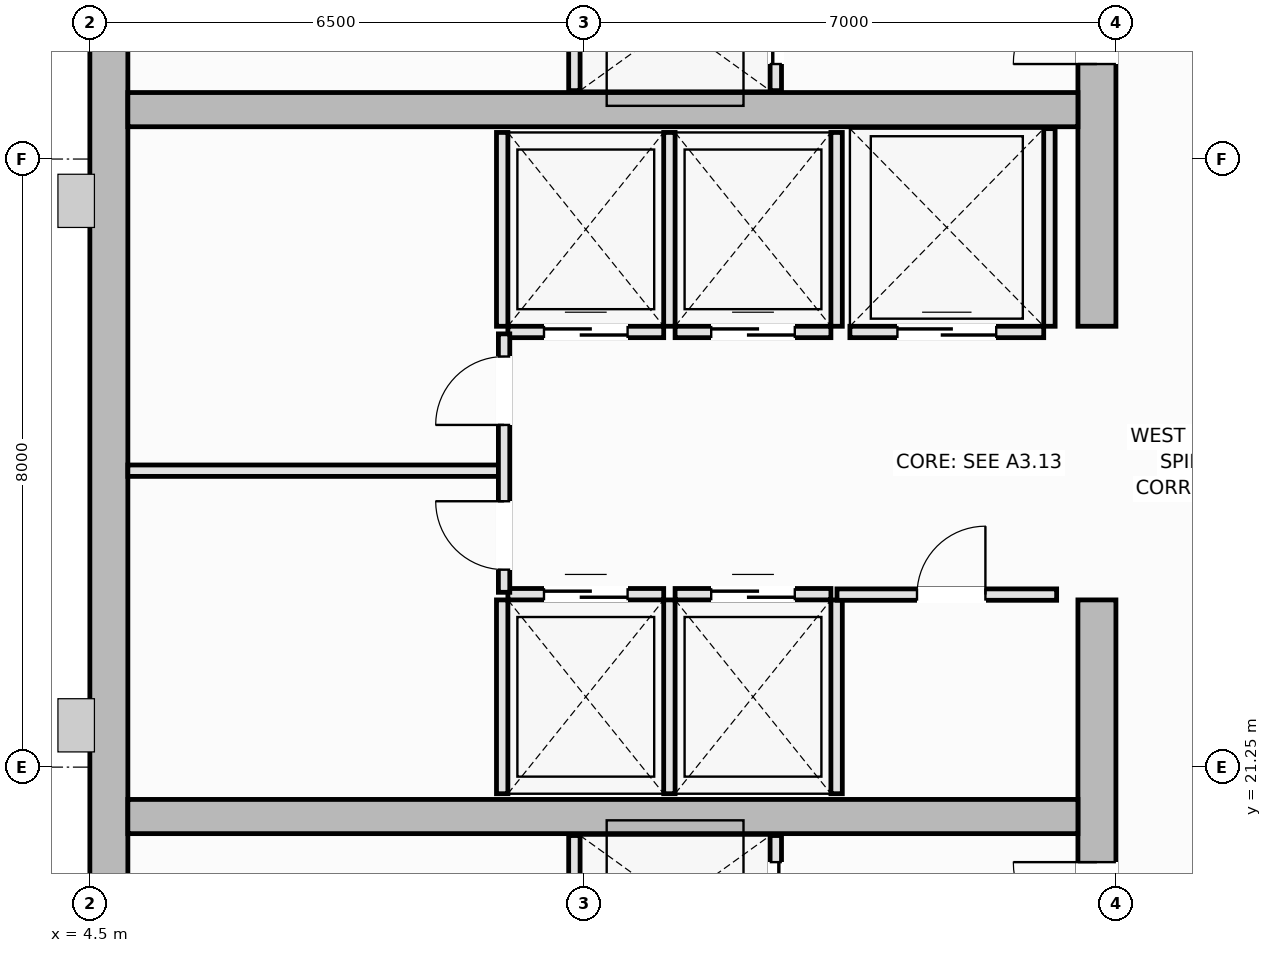
"""IFC4 building model, lengths in metres.
Left out: names, types, materials, properties, quantities, classifications, styles, units other than length and angle.
Written with IfcOpenShell. Run it as: python <this file> out.ifc"""

import sys

from ifc_helpers import new_model, si_unit, direction, frame, frame_2d, origin, place, context, subcontext, project, spatial, rectangle, extrude, element, fill, save


model = new_model("IFC4")
c1 = context("Model", 3, precision=1e-05, world=origin(), true_north=direction((0.0, 1.0)))
c2 = subcontext(c1, "Body", "Model", "MODEL_VIEW")
j1 = project(units=[si_unit("LENGTHUNIT", "METRE"), si_unit("PLANEANGLEUNIT", "RADIAN")], contexts=[c1])
p1 = place(None, origin())
s1 = spatial("IfcSite", under=j1, at=p1, CompositionType="ELEMENT")
p2 = place(p1, origin())
s2 = spatial("IfcBuilding", under=s1, at=p2, CompositionType="ELEMENT")
p3 = place(p2, frame((0.0, 0.0, 259.9)))
s3 = spatial("IfcBuildingStorey", under=s2, at=p3, CompositionType="ELEMENT", Elevation=259.9)
p4 = place(p3, frame((4.75, 14.5, 0.0), z_axis=(0.0, 0.0, 1.0), x_axis=(0.0, 1.0, 0.0)))
e1 = element("IfcWall", 1, at=p4, inside=s3, PredefinedType="SHEAR", context=c2, shape_type="SweptSolid", body=[
    extrude(rectangle(XDim=21.5, YDim=0.5, at=frame_2d((10.75, 0.0))), origin(), (0.0, 0.0, 1.0), 3.55),
])
p5 = place(p3, frame((17.75, 14.5, 0.0), z_axis=(0.0, 0.0, 1.0), x_axis=(0.0, 1.0, 0.0)))
e2 = element("IfcWall", 2, at=p5, inside=s3, PredefinedType="SHEAR", context=c2, shape_type="SweptSolid", body=[
    extrude(rectangle(XDim=8.95, YDim=0.5, at=frame_2d((4.475, 0.0))), origin(), (0.0, 0.0, 1.0), 3.55),
])
p6 = place(p5, frame((4.4, 0.0, 0.0)))
e3 = element("IfcOpeningElement", 3, at=p6, cuts=e2, PredefinedType="OPENING", context=c2, shape_type="SweptSolid", body=[
    extrude(rectangle(XDim=1.1, YDim=2.15, at=frame_2d((0.55, 1.075))), frame((0.0, 0.26, 0.0), z_axis=(0.0, -1.0, 0.0), x_axis=(1.0, 0.0, 0.0)), (0.0, 0.0, 1.0), 0.52),
])
p7 = place(p3, frame((17.75, 27.05, 0.0), z_axis=(0.0, 0.0, 1.0), x_axis=(0.0, 1.0, 0.0)))
e4 = element("IfcWall", 4, at=p7, inside=s3, PredefinedType="SHEAR", context=c2, shape_type="SweptSolid", body=[
    extrude(rectangle(XDim=8.95, YDim=0.5, at=frame_2d((4.475, 0.0))), origin(), (0.0, 0.0, 1.0), 3.55),
])
p8 = place(p7, frame((3.45, 0.0, 0.0)))
e5 = element("IfcOpeningElement", 5, at=p8, cuts=e4, PredefinedType="OPENING", context=c2, shape_type="SweptSolid", body=[
    extrude(rectangle(XDim=1.1, YDim=2.15, at=frame_2d((0.55, 1.075))), frame((0.0, 0.26, 0.0), z_axis=(0.0, -1.0, 0.0), x_axis=(1.0, 0.0, 0.0)), (0.0, 0.0, 1.0), 0.52),
])
for number, where, z_axis, x_axis in (
    (6, (5.0, 20.6, 0.0), (0.0, 0.0, 1.0), (1.0, 0.0, 0.0)),
    (7, (5.0, 29.9, 0.0), (0.0, 0.0, 1.0), (1.0, 0.0, 0.0)),
):
    element("IfcWall", number, at=place(p3, frame(where, z_axis=z_axis, x_axis=x_axis)), inside=s3, PredefinedType="SHEAR", context=c2, shape_type="SweptSolid", body=[
        extrude(rectangle(XDim=12.5, YDim=0.45, at=frame_2d((6.25, 0.0))), origin(), (0.0, 0.0, 1.0), 3.55),
    ])
p9 = place(p3, frame((10.0, 23.525, 0.0), z_axis=(0.0, 0.0, 1.0), x_axis=(1.0, 0.0, 0.0)))
e8 = element("IfcWall", 8, at=p9, inside=s3, PredefinedType="PARTITIONING", context=c2, shape_type="SweptSolid", body=[
    extrude(rectangle(XDim=2.05, YDim=0.15, at=frame_2d((1.025, 0.0))), origin(), (0.0, 0.0, 1.0), 3.39),
])
p10 = place(p9, frame((0.475, 0.0, 0.0)))
e9 = element("IfcOpeningElement", 9, at=p10, cuts=e8, PredefinedType="OPENING", context=c2, shape_type="SweptSolid", body=[
    extrude(rectangle(XDim=1.1, YDim=2.2, at=frame_2d((0.55, 1.1))), frame((0.0, 0.085, 0.0), z_axis=(0.0, -1.0, 0.0), x_axis=(1.0, 0.0, 0.0)), (0.0, 0.0, 1.0), 0.17),
])
for number, where, z_axis, x_axis in (
    (10, (9.925, 20.9, 0.0), (0.0, 0.0, 1.0), (0.0, 1.0, 0.0)),
    (11, (12.125, 20.9, 0.0), (0.0, 0.0, 1.0), (0.0, 1.0, 0.0)),
):
    element("IfcWall", number, at=place(p3, frame(where, z_axis=z_axis, x_axis=x_axis)), inside=s3, PredefinedType="PARTITIONING", context=c2, shape_type="SweptSolid", body=[
        extrude(rectangle(XDim=2.55, YDim=0.15, at=frame_2d((1.275, 0.0))), origin(), (0.0, 0.0, 1.0), 3.39),
    ])
p11 = place(p3, frame((12.2, 23.525, 0.0), z_axis=(0.0, 0.0, 1.0), x_axis=(1.0, 0.0, 0.0)))
e12 = element("IfcWall", 12, at=p11, inside=s3, PredefinedType="PARTITIONING", context=c2, shape_type="SweptSolid", body=[
    extrude(rectangle(XDim=2.05, YDim=0.15, at=frame_2d((1.025, 0.0))), origin(), (0.0, 0.0, 1.0), 3.39),
])
p12 = place(p11, frame((0.475, 0.0, 0.0)))
e13 = element("IfcOpeningElement", 13, at=p12, cuts=e12, PredefinedType="OPENING", context=c2, shape_type="SweptSolid", body=[
    extrude(rectangle(XDim=1.1, YDim=2.2, at=frame_2d((0.55, 1.1))), frame((0.0, 0.085, 0.0), z_axis=(0.0, -1.0, 0.0), x_axis=(1.0, 0.0, 0.0)), (0.0, 0.0, 1.0), 0.17),
])
p13 = place(p3, frame((14.325, 20.9, 0.0), z_axis=(0.0, 0.0, 1.0), x_axis=(0.0, 1.0, 0.0)))
e14 = element("IfcWall", 14, at=p13, inside=s3, PredefinedType="PARTITIONING", context=c2, shape_type="SweptSolid", body=[
    extrude(rectangle(XDim=2.55, YDim=0.15, at=frame_2d((1.275, 0.0))), origin(), (0.0, 0.0, 1.0), 3.39),
])
p14 = place(p3, frame((10.0, 26.975, 0.0), z_axis=(0.0, 0.0, 1.0), x_axis=(1.0, 0.0, 0.0)))
e15 = element("IfcWall", 15, at=p14, inside=s3, PredefinedType="PARTITIONING", context=c2, shape_type="SweptSolid", body=[
    extrude(rectangle(XDim=2.05, YDim=0.15, at=frame_2d((1.025, 0.0))), origin(), (0.0, 0.0, 1.0), 3.39),
])
p15 = place(p14, frame((0.475, 0.0, 0.0)))
e16 = element("IfcOpeningElement", 16, at=p15, cuts=e15, PredefinedType="OPENING", context=c2, shape_type="SweptSolid", body=[
    extrude(rectangle(XDim=1.1, YDim=2.2, at=frame_2d((0.55, 1.1))), frame((0.0, 0.085, 0.0), z_axis=(0.0, -1.0, 0.0), x_axis=(1.0, 0.0, 0.0)), (0.0, 0.0, 1.0), 0.17),
])
for number, where, z_axis, x_axis in (
    (17, (9.925, 27.05, 0.0), (0.0, 0.0, 1.0), (0.0, 1.0, 0.0)),
    (18, (12.125, 27.05, 0.0), (0.0, 0.0, 1.0), (0.0, 1.0, 0.0)),
):
    element("IfcWall", number, at=place(p3, frame(where, z_axis=z_axis, x_axis=x_axis)), inside=s3, PredefinedType="PARTITIONING", context=c2, shape_type="SweptSolid", body=[
        extrude(rectangle(XDim=2.55, YDim=0.15, at=frame_2d((1.275, 0.0))), origin(), (0.0, 0.0, 1.0), 3.39),
    ])
p16 = place(p3, frame((12.2, 26.975, 0.0), z_axis=(0.0, 0.0, 1.0), x_axis=(1.0, 0.0, 0.0)))
e19 = element("IfcWall", 19, at=p16, inside=s3, PredefinedType="PARTITIONING", context=c2, shape_type="SweptSolid", body=[
    extrude(rectangle(XDim=2.05, YDim=0.15, at=frame_2d((1.025, 0.0))), origin(), (0.0, 0.0, 1.0), 3.39),
])
p17 = place(p16, frame((0.475, 0.0, 0.0)))
e20 = element("IfcOpeningElement", 20, at=p17, cuts=e19, PredefinedType="OPENING", context=c2, shape_type="SweptSolid", body=[
    extrude(rectangle(XDim=1.1, YDim=2.2, at=frame_2d((0.55, 1.1))), frame((0.0, 0.085, 0.0), z_axis=(0.0, -1.0, 0.0), x_axis=(1.0, 0.0, 0.0)), (0.0, 0.0, 1.0), 0.17),
])
p18 = place(p3, frame((14.325, 27.05, 0.0), z_axis=(0.0, 0.0, 1.0), x_axis=(0.0, 1.0, 0.0)))
e21 = element("IfcWall", 21, at=p18, inside=s3, PredefinedType="PARTITIONING", context=c2, shape_type="SweptSolid", body=[
    extrude(rectangle(XDim=2.55, YDim=0.15, at=frame_2d((1.275, 0.0))), origin(), (0.0, 0.0, 1.0), 3.39),
])
p19 = place(p3, frame((14.5, 26.975, 0.0), z_axis=(0.0, 0.0, 1.0), x_axis=(1.0, 0.0, 0.0)))
e22 = element("IfcWall", 22, at=p19, inside=s3, PredefinedType="PARTITIONING", context=c2, shape_type="SweptSolid", body=[
    extrude(rectangle(XDim=2.55, YDim=0.15, at=frame_2d((1.275, 0.0))), origin(), (0.0, 0.0, 1.0), 3.39),
])
p20 = place(p19, frame((0.625, 0.0, 0.0)))
e23 = element("IfcOpeningElement", 23, at=p20, cuts=e22, PredefinedType="OPENING", context=c2, shape_type="SweptSolid", body=[
    extrude(rectangle(XDim=1.3, YDim=2.2, at=frame_2d((0.65, 1.1))), frame((0.0, 0.085, 0.0), z_axis=(0.0, -1.0, 0.0), x_axis=(1.0, 0.0, 0.0)), (0.0, 0.0, 1.0), 0.17),
])
p21 = place(p3, frame((17.125, 27.05, 0.0), z_axis=(0.0, 0.0, 1.0), x_axis=(0.0, 1.0, 0.0)))
e24 = element("IfcWall", 24, at=p21, inside=s3, PredefinedType="PARTITIONING", context=c2, shape_type="SweptSolid", body=[
    extrude(rectangle(XDim=2.6, YDim=0.15, at=frame_2d((1.3, 0.0))), origin(), (0.0, 0.0, 1.0), 3.39),
])
p22 = place(p3, frame((10.875, 18.55, 0.0), z_axis=(0.0, 0.0, 1.0), x_axis=(0.0, 1.0, 0.0)))
e25 = element("IfcWall", 25, at=p22, inside=s3, PredefinedType="PARTITIONING", context=c2, shape_type="SweptSolid", body=[
    extrude(rectangle(XDim=1.8, YDim=0.15, at=frame_2d((0.9, 0.0))), origin(), (0.0, 0.0, 1.0), 3.39),
])
p23 = place(p3, frame((13.525, 18.55, 0.0), z_axis=(0.0, 0.0, 1.0), x_axis=(0.0, 1.0, 0.0)))
e26 = element("IfcWall", 26, at=p23, inside=s3, PredefinedType="PARTITIONING", context=c2, shape_type="SweptSolid", body=[
    extrude(rectangle(XDim=1.8, YDim=0.15, at=frame_2d((0.9, 0.0))), origin(), (0.0, 0.0, 1.0), 3.39),
])
p24 = place(p23, frame((0.35, 0.0, 0.0)))
e27 = element("IfcOpeningElement", 27, at=p24, cuts=e26, PredefinedType="OPENING", context=c2, shape_type="SweptSolid", body=[
    extrude(rectangle(XDim=1.1, YDim=2.2, at=frame_2d((0.55, 1.1))), frame((0.0, 0.085, 0.0), z_axis=(0.0, -1.0, 0.0), x_axis=(1.0, 0.0, 0.0)), (0.0, 0.0, 1.0), 0.17),
])
p25 = place(p3, frame((10.875, 30.15, 0.0), z_axis=(0.0, 0.0, 1.0), x_axis=(0.0, 1.0, 0.0)))
e28 = element("IfcWall", 28, at=p25, inside=s3, PredefinedType="PARTITIONING", context=c2, shape_type="SweptSolid", body=[
    extrude(rectangle(XDim=1.8, YDim=0.15, at=frame_2d((0.9, 0.0))), origin(), (0.0, 0.0, 1.0), 3.39),
])
p26 = place(p3, frame((13.525, 30.15, 0.0), z_axis=(0.0, 0.0, 1.0), x_axis=(0.0, 1.0, 0.0)))
e29 = element("IfcWall", 29, at=p26, inside=s3, PredefinedType="PARTITIONING", context=c2, shape_type="SweptSolid", body=[
    extrude(rectangle(XDim=1.8, YDim=0.15, at=frame_2d((0.9, 0.0))), origin(), (0.0, 0.0, 1.0), 3.39),
])
p27 = place(p26, frame((0.35, 0.0, 0.0)))
e30 = element("IfcOpeningElement", 30, at=p27, cuts=e29, PredefinedType="OPENING", context=c2, shape_type="SweptSolid", body=[
    extrude(rectangle(XDim=1.1, YDim=2.2, at=frame_2d((0.55, 1.1))), frame((0.0, 0.085, 0.0), z_axis=(0.0, -1.0, 0.0), x_axis=(1.0, 0.0, 0.0)), (0.0, 0.0, 1.0), 0.17),
])
p28 = place(p3, frame((5.0, 25.15, 0.0), z_axis=(0.0, 0.0, 1.0), x_axis=(1.0, 0.0, 0.0)))
e31 = element("IfcWall", 31, at=p28, inside=s3, PredefinedType="PARTITIONING", context=c2, shape_type="SweptSolid", body=[
    extrude(rectangle(XDim=4.95, YDim=0.15, at=frame_2d((2.475, 0.0))), origin(), (0.0, 0.0, 1.0), 3.39),
])
p29 = place(p3, frame((9.95, 23.55, 0.0), z_axis=(0.0, 0.0, 1.0), x_axis=(0.0, 1.0, 0.0)))
e32 = element("IfcWall", 32, at=p29, inside=s3, PredefinedType="PARTITIONING", context=c2, shape_type="SweptSolid", body=[
    extrude(rectangle(XDim=3.4, YDim=0.15, at=frame_2d((1.7, 0.0))), origin(), (0.0, 0.0, 1.0), 3.39),
])
p30 = place(p29, frame((0.298, 0.0, 0.0)))
e33 = element("IfcOpeningElement", 33, at=p30, cuts=e32, PredefinedType="OPENING", context=c2, shape_type="SweptSolid", body=[
    extrude(rectangle(XDim=0.9, YDim=2.1, at=frame_2d((0.45, 1.05))), frame((0.0, 0.085, 0.0), z_axis=(0.0, -1.0, 0.0), x_axis=(1.0, 0.0, 0.0)), (0.0, 0.0, 1.0), 0.17),
])
p31 = place(p29, frame((2.202, 0.0, 0.0)))
e34 = element("IfcOpeningElement", 34, at=p31, cuts=e32, PredefinedType="OPENING", context=c2, shape_type="SweptSolid", body=[
    extrude(rectangle(XDim=0.9, YDim=2.1, at=frame_2d((0.45, 1.05))), frame((0.0, 0.085, 0.0), z_axis=(0.0, -1.0, 0.0), x_axis=(1.0, 0.0, 0.0)), (0.0, 0.0, 1.0), 0.17),
])
p32 = place(p3, frame((14.33, 23.52, 0.0), z_axis=(0.0, 0.0, 1.0), x_axis=(1.0, 0.0, 0.0)))
e35 = element("IfcWall", 35, at=p32, inside=s3, PredefinedType="PARTITIONING", context=c2, shape_type="SweptSolid", body=[
    extrude(rectangle(XDim=2.89, YDim=0.15, at=frame_2d((1.445, 0.0))), origin(), (0.0, 0.0, 1.0), 3.39),
])
p33 = place(p32, frame((1.053, 0.0, 0.0)))
e36 = element("IfcOpeningElement", 36, at=p33, cuts=e35, PredefinedType="OPENING", context=c2, shape_type="SweptSolid", body=[
    extrude(rectangle(XDim=0.9, YDim=2.1, at=frame_2d((0.45, 1.05))), frame((0.0, 0.085, 0.0), z_axis=(0.0, -1.0, 0.0), x_axis=(1.0, 0.0, 0.0)), (0.0, 0.0, 1.0), 0.17),
])
p34 = place(p10, origin())
e37 = element("IfcDoor", 37, at=p34, inside=s3, OperationType="DOUBLE_DOOR_SLIDING", PredefinedType="DOOR", context=c2, shape_type="SweptSolid", body=[
    extrude(rectangle(XDim=1.1, YDim=2.2, at=frame_2d((0.55, 1.1))), frame((0.0, 0.025, 0.0), z_axis=(0.0, -1.0, 0.0), x_axis=(1.0, 0.0, 0.0)), (0.0, 0.0, 1.0), 0.05),
])
fill(e9, e37)
p35 = place(p12, origin())
e38 = element("IfcDoor", 38, at=p35, inside=s3, OperationType="DOUBLE_DOOR_SLIDING", PredefinedType="DOOR", context=c2, shape_type="SweptSolid", body=[
    extrude(rectangle(XDim=1.1, YDim=2.2, at=frame_2d((0.55, 1.1))), frame((0.0, 0.025, 0.0), z_axis=(0.0, -1.0, 0.0), x_axis=(1.0, 0.0, 0.0)), (0.0, 0.0, 1.0), 0.05),
])
fill(e13, e38)
p36 = place(p15, origin())
e39 = element("IfcDoor", 39, at=p36, inside=s3, OperationType="DOUBLE_DOOR_SLIDING", PredefinedType="DOOR", context=c2, shape_type="SweptSolid", body=[
    extrude(rectangle(XDim=1.1, YDim=2.2, at=frame_2d((0.55, 1.1))), frame((0.0, 0.025, 0.0), z_axis=(0.0, -1.0, 0.0), x_axis=(1.0, 0.0, 0.0)), (0.0, 0.0, 1.0), 0.05),
])
fill(e16, e39)
p37 = place(p17, origin())
e40 = element("IfcDoor", 40, at=p37, inside=s3, OperationType="DOUBLE_DOOR_SLIDING", PredefinedType="DOOR", context=c2, shape_type="SweptSolid", body=[
    extrude(rectangle(XDim=1.1, YDim=2.2, at=frame_2d((0.55, 1.1))), frame((0.0, 0.025, 0.0), z_axis=(0.0, -1.0, 0.0), x_axis=(1.0, 0.0, 0.0)), (0.0, 0.0, 1.0), 0.05),
])
fill(e20, e40)
p38 = place(p20, origin())
e41 = element("IfcDoor", 41, at=p38, inside=s3, OperationType="DOUBLE_DOOR_SLIDING", PredefinedType="DOOR", context=c2, shape_type="SweptSolid", body=[
    extrude(rectangle(XDim=1.3, YDim=2.2, at=frame_2d((0.65, 1.1))), frame((0.0, 0.025, 0.0), z_axis=(0.0, -1.0, 0.0), x_axis=(1.0, 0.0, 0.0)), (0.0, 0.0, 1.0), 0.05),
])
fill(e23, e41)
p39 = place(p24, origin())
e42 = element("IfcDoor", 42, at=p39, inside=s3, OperationType="DOUBLE_DOOR_SLIDING", PredefinedType="DOOR", context=c2, shape_type="SweptSolid", body=[
    extrude(rectangle(XDim=1.1, YDim=2.2, at=frame_2d((0.55, 1.1))), frame((0.0, 0.025, 0.0), z_axis=(0.0, -1.0, 0.0), x_axis=(1.0, 0.0, 0.0)), (0.0, 0.0, 1.0), 0.05),
])
fill(e27, e42)
p40 = place(p27, origin())
e43 = element("IfcDoor", 43, at=p40, inside=s3, OperationType="DOUBLE_DOOR_SLIDING", PredefinedType="DOOR", context=c2, shape_type="SweptSolid", body=[
    extrude(rectangle(XDim=1.1, YDim=2.2, at=frame_2d((0.55, 1.1))), frame((0.0, 0.025, 0.0), z_axis=(0.0, -1.0, 0.0), x_axis=(1.0, 0.0, 0.0)), (0.0, 0.0, 1.0), 0.05),
])
fill(e30, e43)
p41 = place(p6, origin())
e44 = element("IfcDoor", 44, at=p41, inside=s3, OperationType="SINGLE_SWING_RIGHT", PredefinedType="DOOR", context=c2, shape_type="SweptSolid", body=[
    extrude(rectangle(XDim=1.1, YDim=2.15, at=frame_2d((0.55, 1.075))), frame((0.0, 0.025, 0.0), z_axis=(0.0, -1.0, 0.0), x_axis=(1.0, 0.0, 0.0)), (0.0, 0.0, 1.0), 0.05),
])
fill(e3, e44)
p42 = place(p8, origin())
e45 = element("IfcDoor", 45, at=p42, inside=s3, OperationType="SINGLE_SWING_LEFT", PredefinedType="DOOR", context=c2, shape_type="SweptSolid", body=[
    extrude(rectangle(XDim=1.1, YDim=2.15, at=frame_2d((0.55, 1.075))), frame((0.0, 0.025, 0.0), z_axis=(0.0, -1.0, 0.0), x_axis=(1.0, 0.0, 0.0)), (0.0, 0.0, 1.0), 0.05),
])
fill(e5, e45)
p43 = place(p30, origin())
e46 = element("IfcDoor", 46, at=p43, inside=s3, OperationType="SINGLE_SWING_RIGHT", PredefinedType="DOOR", context=c2, shape_type="SweptSolid", body=[
    extrude(rectangle(XDim=0.9, YDim=2.1, at=frame_2d((0.45, 1.05))), frame((0.0, 0.025, 0.0), z_axis=(0.0, -1.0, 0.0), x_axis=(1.0, 0.0, 0.0)), (0.0, 0.0, 1.0), 0.05),
])
fill(e33, e46)
p44 = place(p31, origin())
e47 = element("IfcDoor", 47, at=p44, inside=s3, OperationType="SINGLE_SWING_LEFT", PredefinedType="DOOR", context=c2, shape_type="SweptSolid", body=[
    extrude(rectangle(XDim=0.9, YDim=2.1, at=frame_2d((0.45, 1.05))), frame((0.0, 0.025, 0.0), z_axis=(0.0, -1.0, 0.0), x_axis=(1.0, 0.0, 0.0)), (0.0, 0.0, 1.0), 0.05),
])
fill(e34, e47)
p45 = place(p33, origin())
e48 = element("IfcDoor", 48, at=p45, inside=s3, OperationType="SINGLE_SWING_RIGHT", PredefinedType="DOOR", context=c2, shape_type="SweptSolid", body=[
    extrude(rectangle(XDim=0.9, YDim=2.1, at=frame_2d((0.45, 1.05))), frame((0.0, 0.025, 0.0), z_axis=(0.0, -1.0, 0.0), x_axis=(1.0, 0.0, 0.0)), (0.0, 0.0, 1.0), 0.05),
])
fill(e36, e48)
save(model, sys.argv[1])
